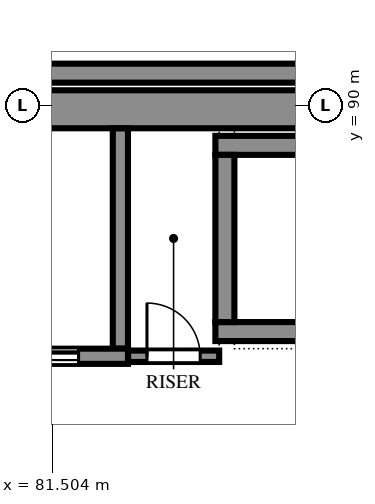
"""IFC4 building model, lengths in metres.
Left out: names, types, materials, properties, quantities, classifications, styles, units other than length and angle.
Written with IfcOpenShell. Run it as: python <this file> out.ifc"""

import sys

from ifc_helpers import new_model, si_unit, direction, frame, frame_2d, origin, place, context, subcontext, project, spatial, polyline, rectangle, outline, extrude, element, fill, save


model = new_model("IFC4")
c1 = context("Model", 3, precision=1e-05, world=origin(), true_north=direction((0.0, 1.0)))
c2 = subcontext(c1, "Body", "Model", "MODEL_VIEW")
j1 = project(units=[si_unit("LENGTHUNIT", "METRE"), si_unit("PLANEANGLEUNIT", "RADIAN")], contexts=[c1])
p1 = place(None, origin())
s1 = spatial("IfcSite", under=j1, at=p1, CompositionType="ELEMENT")
p2 = place(p1, origin())
s2 = spatial("IfcBuilding", under=s1, at=p2, CompositionType="ELEMENT")
p3 = place(p2, frame((0.0, 0.0, 11.7)))
s3 = spatial("IfcBuildingStorey", under=s2, at=p3, CompositionType="ELEMENT", Elevation=11.7)
p4 = place(p3, frame((71.8, 89.95, 0.0), z_axis=(0.0, 0.0, 1.0), x_axis=(1.0, 0.0, 0.0)))
e1 = element("IfcWall", 1, at=p4, inside=s3, PredefinedType="SOLIDWALL", context=c2, shape_type="SweptSolid", body=[
    extrude(rectangle(XDim=18.4, YDim=0.5, at=frame_2d((9.2, 0.0))), origin(), (0.0, 0.0, 1.0), 4.2),
])
p5 = place(p3, frame((71.45, 90.425, 0.0), z_axis=(0.0, 0.0, 1.0), x_axis=(1.0, 0.0, 0.0)))
e2 = element("IfcWall", 2, at=p5, inside=s3, PredefinedType="SOLIDWALL", context=c2, shape_type="SweptSolid", body=[
    extrude(outline(polyline([(0.0, 0.0), (19.1, 0.0), (19.1, 12.6), (0.0, 12.6), (0.0, 0.0)]), holes=[polyline([(1.308, 2.439), (1.352, 2.546), (1.408, 2.646), (1.475, 2.74), (1.552, 2.826), (1.638, 2.903), (1.732, 2.969), (1.833, 3.025), (1.939, 3.068), (2.05, 3.1), (2.161, 3.068), (2.267, 3.025), (2.368, 2.969), (2.462, 2.903), (2.549, 2.826), (2.625, 2.74), (2.692, 2.646), (2.748, 2.546), (2.792, 2.439), (2.824, 2.329), (2.844, 2.215), (2.85, 2.1), (2.85, 0.6), (1.25, 0.6), (1.25, 2.1), (1.257, 2.215), (1.276, 2.329), (1.308, 2.439)]), polyline([(4.308, 2.439), (4.352, 2.546), (4.408, 2.646), (4.475, 2.74), (4.552, 2.826), (4.638, 2.903), (4.732, 2.969), (4.833, 3.025), (4.939, 3.068), (5.05, 3.1), (5.161, 3.068), (5.267, 3.025), (5.368, 2.969), (5.462, 2.903), (5.549, 2.826), (5.625, 2.74), (5.692, 2.646), (5.748, 2.546), (5.792, 2.439), (5.824, 2.329), (5.844, 2.215), (5.85, 2.1), (5.85, 0.6), (4.25, 0.6), (4.25, 2.1), (4.257, 2.215), (4.276, 2.329), (4.308, 2.439)]), polyline([(7.308, 2.439), (7.352, 2.546), (7.408, 2.646), (7.475, 2.74), (7.552, 2.826), (7.638, 2.903), (7.732, 2.969), (7.833, 3.025), (7.939, 3.068), (8.05, 3.1), (8.161, 3.068), (8.267, 3.025), (8.368, 2.969), (8.462, 2.903), (8.549, 2.826), (8.625, 2.74), (8.692, 2.646), (8.748, 2.546), (8.792, 2.439), (8.824, 2.329), (8.844, 2.215), (8.85, 2.1), (8.85, 0.6), (7.25, 0.6), (7.25, 2.1), (7.257, 2.215), (7.276, 2.329), (7.308, 2.439)]), polyline([(1.308, 6.639), (1.352, 6.746), (1.408, 6.846), (1.475, 6.94), (1.552, 7.026), (1.638, 7.103), (1.732, 7.169), (1.833, 7.225), (1.939, 7.269), (2.05, 7.3), (2.161, 7.269), (2.267, 7.225), (2.368, 7.169), (2.462, 7.103), (2.549, 7.026), (2.625, 6.94), (2.692, 6.846), (2.748, 6.746), (2.792, 6.639), (2.824, 6.529), (2.844, 6.415), (2.85, 6.3), (2.85, 4.8), (1.25, 4.8), (1.25, 6.3), (1.257, 6.415), (1.276, 6.529), (1.308, 6.639)]), polyline([(4.308, 6.639), (4.352, 6.746), (4.408, 6.846), (4.475, 6.94), (4.552, 7.026), (4.638, 7.103), (4.732, 7.169), (4.833, 7.225), (4.939, 7.269), (5.05, 7.3), (5.161, 7.269), (5.267, 7.225), (5.368, 7.169), (5.462, 7.103), (5.549, 7.026), (5.625, 6.94), (5.692, 6.846), (5.748, 6.746), (5.792, 6.639), (5.824, 6.529), (5.844, 6.415), (5.85, 6.3), (5.85, 4.8), (4.25, 4.8), (4.25, 6.3), (4.257, 6.415), (4.276, 6.529), (4.308, 6.639)]), polyline([(7.308, 6.639), (7.352, 6.746), (7.408, 6.846), (7.475, 6.94), (7.552, 7.026), (7.638, 7.103), (7.732, 7.169), (7.833, 7.225), (7.939, 7.269), (8.05, 7.3), (8.161, 7.269), (8.267, 7.225), (8.368, 7.169), (8.462, 7.103), (8.549, 7.026), (8.625, 6.94), (8.692, 6.846), (8.748, 6.746), (8.792, 6.639), (8.824, 6.529), (8.844, 6.415), (8.85, 6.3), (8.85, 4.8), (7.25, 4.8), (7.25, 6.3), (7.257, 6.415), (7.276, 6.529), (7.308, 6.639)]), polyline([(1.308, 10.839), (1.352, 10.946), (1.408, 11.046), (1.475, 11.14), (1.552, 11.226), (1.638, 11.303), (1.732, 11.369), (1.833, 11.425), (1.939, 11.469), (2.05, 11.5), (2.161, 11.469), (2.267, 11.425), (2.368, 11.369), (2.462, 11.303), (2.549, 11.226), (2.625, 11.14), (2.692, 11.046), (2.748, 10.946), (2.792, 10.839), (2.824, 10.729), (2.844, 10.615), (2.85, 10.5), (2.85, 9.0), (1.25, 9.0), (1.25, 10.5), (1.257, 10.615), (1.276, 10.729), (1.308, 10.839)]), polyline([(4.352, 10.946), (4.408, 11.046), (4.475, 11.14), (4.552, 11.226), (4.638, 11.303), (4.732, 11.369), (4.833, 11.425), (4.939, 11.469), (5.05, 11.5), (5.161, 11.469), (5.267, 11.425), (5.368, 11.369), (5.462, 11.303), (5.549, 11.226), (5.625, 11.14), (5.692, 11.046), (5.748, 10.946), (5.792, 10.839), (5.824, 10.729), (5.844, 10.615), (5.85, 10.5), (5.85, 9.0), (4.25, 9.0), (4.25, 10.5), (4.257, 10.615), (4.276, 10.729), (4.308, 10.839), (4.352, 10.946)]), polyline([(7.352, 10.946), (7.408, 11.046), (7.475, 11.14), (7.552, 11.226), (7.638, 11.303), (7.732, 11.369), (7.833, 11.425), (7.939, 11.469), (8.05, 11.5), (8.161, 11.469), (8.267, 11.425), (8.368, 11.369), (8.462, 11.303), (8.549, 11.226), (8.625, 11.14), (8.692, 11.046), (8.748, 10.946), (8.792, 10.839), (8.824, 10.729), (8.844, 10.615), (8.85, 10.5), (8.85, 9.0), (7.25, 9.0), (7.25, 10.5), (7.257, 10.615), (7.276, 10.729), (7.308, 10.839), (7.352, 10.946)]), polyline([(10.308, 2.439), (10.352, 2.546), (10.408, 2.646), (10.475, 2.74), (10.552, 2.826), (10.638, 2.903), (10.732, 2.969), (10.833, 3.025), (10.939, 3.068), (11.05, 3.1), (11.161, 3.068), (11.267, 3.025), (11.368, 2.969), (11.462, 2.903), (11.549, 2.826), (11.625, 2.74), (11.692, 2.646), (11.748, 2.546), (11.792, 2.439), (11.824, 2.329), (11.844, 2.215), (11.85, 2.1), (11.85, 0.6), (10.25, 0.6), (10.25, 2.1), (10.257, 2.215), (10.276, 2.329), (10.308, 2.439)]), polyline([(13.308, 2.439), (13.352, 2.546), (13.408, 2.646), (13.475, 2.74), (13.552, 2.826), (13.638, 2.903), (13.732, 2.969), (13.833, 3.025), (13.939, 3.068), (14.05, 3.1), (14.161, 3.068), (14.267, 3.025), (14.368, 2.969), (14.462, 2.903), (14.549, 2.826), (14.625, 2.74), (14.692, 2.646), (14.748, 2.546), (14.792, 2.439), (14.824, 2.329), (14.844, 2.215), (14.85, 2.1), (14.85, 0.6), (13.25, 0.6), (13.25, 2.1), (13.257, 2.215), (13.276, 2.329), (13.308, 2.439)]), polyline([(16.308, 2.439), (16.352, 2.546), (16.408, 2.646), (16.475, 2.74), (16.552, 2.826), (16.638, 2.903), (16.732, 2.969), (16.833, 3.025), (16.939, 3.068), (17.05, 3.1), (17.161, 3.068), (17.267, 3.025), (17.368, 2.969), (17.462, 2.903), (17.549, 2.826), (17.625, 2.74), (17.692, 2.646), (17.748, 2.546), (17.792, 2.439), (17.824, 2.329), (17.844, 2.215), (17.85, 2.1), (17.85, 0.6), (16.25, 0.6), (16.25, 2.1), (16.257, 2.215), (16.276, 2.329), (16.308, 2.439)]), polyline([(10.308, 6.639), (10.352, 6.746), (10.408, 6.846), (10.475, 6.94), (10.552, 7.026), (10.638, 7.103), (10.732, 7.169), (10.833, 7.225), (10.939, 7.269), (11.05, 7.3), (11.161, 7.269), (11.267, 7.225), (11.368, 7.169), (11.462, 7.103), (11.549, 7.026), (11.625, 6.94), (11.692, 6.846), (11.748, 6.746), (11.792, 6.639), (11.824, 6.529), (11.844, 6.415), (11.85, 6.3), (11.85, 4.8), (10.25, 4.8), (10.25, 6.3), (10.257, 6.415), (10.276, 6.529), (10.308, 6.639)]), polyline([(13.308, 6.639), (13.352, 6.746), (13.408, 6.846), (13.475, 6.94), (13.552, 7.026), (13.638, 7.103), (13.732, 7.169), (13.833, 7.225), (13.939, 7.269), (14.05, 7.3), (14.161, 7.269), (14.267, 7.225), (14.368, 7.169), (14.462, 7.103), (14.549, 7.026), (14.625, 6.94), (14.692, 6.846), (14.748, 6.746), (14.792, 6.639), (14.824, 6.529), (14.844, 6.415), (14.85, 6.3), (14.85, 4.8), (13.25, 4.8), (13.25, 6.3), (13.257, 6.415), (13.276, 6.529), (13.308, 6.639)]), polyline([(16.308, 6.639), (16.352, 6.746), (16.408, 6.846), (16.475, 6.94), (16.552, 7.026), (16.638, 7.103), (16.732, 7.169), (16.833, 7.225), (16.939, 7.269), (17.05, 7.3), (17.161, 7.269), (17.267, 7.225), (17.368, 7.169), (17.462, 7.103), (17.549, 7.026), (17.625, 6.94), (17.692, 6.846), (17.748, 6.746), (17.792, 6.639), (17.824, 6.529), (17.844, 6.415), (17.85, 6.3), (17.85, 4.8), (16.25, 4.8), (16.25, 6.3), (16.257, 6.415), (16.276, 6.529), (16.308, 6.639)]), polyline([(10.308, 10.839), (10.352, 10.946), (10.408, 11.046), (10.475, 11.14), (10.552, 11.226), (10.638, 11.303), (10.732, 11.369), (10.833, 11.425), (10.939, 11.469), (11.05, 11.5), (11.161, 11.469), (11.267, 11.425), (11.368, 11.369), (11.462, 11.303), (11.549, 11.226), (11.625, 11.14), (11.692, 11.046), (11.748, 10.946), (11.792, 10.839), (11.824, 10.729), (11.844, 10.615), (11.85, 10.5), (11.85, 9.0), (10.25, 9.0), (10.25, 10.5), (10.257, 10.615), (10.276, 10.729), (10.308, 10.839)]), polyline([(13.352, 10.946), (13.408, 11.046), (13.475, 11.14), (13.552, 11.226), (13.638, 11.303), (13.732, 11.369), (13.833, 11.425), (13.939, 11.469), (14.05, 11.5), (14.161, 11.469), (14.267, 11.425), (14.368, 11.369), (14.462, 11.303), (14.549, 11.226), (14.625, 11.14), (14.692, 11.046), (14.748, 10.946), (14.792, 10.839), (14.824, 10.729), (14.844, 10.615), (14.85, 10.5), (14.85, 9.0), (13.25, 9.0), (13.25, 10.5), (13.257, 10.615), (13.276, 10.729), (13.308, 10.839), (13.352, 10.946)]), polyline([(16.352, 10.946), (16.408, 11.046), (16.475, 11.14), (16.552, 11.226), (16.638, 11.303), (16.732, 11.369), (16.833, 11.425), (16.939, 11.469), (17.05, 11.5), (17.161, 11.469), (17.267, 11.425), (17.368, 11.369), (17.462, 11.303), (17.549, 11.226), (17.625, 11.14), (17.692, 11.046), (17.748, 10.946), (17.792, 10.839), (17.824, 10.729), (17.844, 10.615), (17.85, 10.5), (17.85, 9.0), (16.25, 9.0), (16.25, 10.5), (16.257, 10.615), (16.276, 10.729), (16.308, 10.839), (16.352, 10.946)])]), frame((0.0, 0.125, 0.0), z_axis=(0.0, -1.0, 0.0), x_axis=(1.0, 0.0, 0.0)), (0.0, 0.0, 1.0), 0.25),
])
p6 = place(p3, frame((80.302, 86.7, 0.0), z_axis=(0.0, 0.0, 1.0), x_axis=(1.0, 0.0, 0.0)))
e3 = element("IfcWall", 3, at=p6, inside=s3, PredefinedType="SOLIDWALL", context=c2, shape_type="SweptSolid", body=[
    extrude(rectangle(XDim=2.198, YDim=0.2, at=frame_2d((1.099, 0.0))), origin(), (0.0, 0.0, 1.0), 3.516),
])
p7 = place(p6, frame((0.448, 0.0, 0.0)))
e4 = element("IfcOpeningElement", 4, at=p7, cuts=e3, PredefinedType="OPENING", context=c2, shape_type="SweptSolid", body=[
    extrude(rectangle(XDim=1.1, YDim=2.1, at=frame_2d((0.55, 1.05))), frame((0.0, 0.11, 0.0), z_axis=(0.0, -1.0, 0.0), x_axis=(1.0, 0.0, 0.0)), (0.0, 0.0, 1.0), 0.22),
])
p8 = place(p3, frame((82.4, 86.8, 0.0), z_axis=(0.0, 0.0, 1.0), x_axis=(0.0, 1.0, 0.0)))
e5 = element("IfcWall", 5, at=p8, inside=s3, PredefinedType="SOLIDWALL", context=c2, shape_type="SweptSolid", body=[
    extrude(rectangle(XDim=2.898, YDim=0.2, at=frame_2d((1.449, 0.0))), origin(), (0.0, 0.0, 1.0), 3.516),
])
for number, where, z_axis, x_axis in (
    (6, (83.65, 87.025, 0.0), (0.0, 0.0, 1.0), (1.0, 0.0, 0.0)),
    (7, (83.65, 89.475, 0.0), (0.0, 0.0, 1.0), (1.0, 0.0, 0.0)),
):
    element("IfcWall", number, at=place(p3, frame(where, z_axis=z_axis, x_axis=x_axis)), inside=s3, PredefinedType="SOLIDWALL", context=c2, shape_type="SweptSolid", body=[
        extrude(rectangle(XDim=3.4, YDim=0.25, at=frame_2d((1.7, 0.0))), origin(), (0.0, 0.0, 1.0), 3.516),
    ])
p9 = place(p3, frame((83.775, 87.15, 0.0), z_axis=(0.0, 0.0, 1.0), x_axis=(0.0, 1.0, 0.0)))
e8 = element("IfcWall", 8, at=p9, inside=s3, PredefinedType="SOLIDWALL", context=c2, shape_type="SweptSolid", body=[
    extrude(rectangle(XDim=2.2, YDim=0.25, at=frame_2d((1.1, 0.0))), origin(), (0.0, 0.0, 1.0), 3.516),
])
p10 = place(p3, frame((82.502, 86.7, 0.0), z_axis=(0.0, 0.0, 1.0), x_axis=(1.0, 0.0, 0.0)))
e9 = element("IfcWall", 9, at=p10, inside=s3, PredefinedType="SOLIDWALL", context=c2, shape_type="SweptSolid", body=[
    extrude(rectangle(XDim=1.198, YDim=0.15, at=frame_2d((0.599, 0.0))), origin(), (0.0, 0.0, 1.0), 3.516),
])
p11 = place(p10, frame((0.248, 0.0, 0.0)))
e10 = element("IfcOpeningElement", 10, at=p11, cuts=e9, PredefinedType="OPENING", context=c2, shape_type="SweptSolid", body=[
    extrude(rectangle(XDim=0.7, YDim=2.0, at=frame_2d((0.35, 1.0))), frame((0.0, 0.085, 0.0), z_axis=(0.0, -1.0, 0.0), x_axis=(1.0, 0.0, 0.0)), (0.0, 0.0, 1.0), 0.17),
])
p12 = place(p7, origin())
e11 = element("IfcDoor", 11, at=p12, inside=s3, OperationType="SLIDING_TO_LEFT", PredefinedType="DOOR", context=c2, shape_type="SweptSolid", body=[
    extrude(outline(polyline([(0.0, 0.0), (0.07, 0.0), (0.07, 2.03), (1.03, 2.03), (1.03, 0.0), (1.1, 0.0), (1.1, 2.1), (0.0, 2.1), (0.0, 0.0)])), frame((0.0, 0.025, 0.0), z_axis=(0.0, -1.0, 0.0), x_axis=(1.0, 0.0, 0.0)), (0.0, 0.0, 1.0), 0.05),
    extrude(rectangle(XDim=0.524, YDim=2.016, at=frame_2d((0.336, 1.018))), frame((0.0, 0.018, 0.0), z_axis=(0.0, -1.0, 0.0), x_axis=(1.0, 0.0, 0.0)), (0.0, 0.0, 1.0), 0.016),
    extrude(rectangle(XDim=0.52, YDim=2.016, at=frame_2d((0.766, 1.018))), frame((0.0, -0.002, 0.0), z_axis=(0.0, -1.0, 0.0), x_axis=(1.0, 0.0, 0.0)), (0.0, 0.0, 1.0), 0.016),
])
fill(e4, e11)
p13 = place(p11, origin())
e12 = element("IfcDoor", 12, at=p13, inside=s3, OperationType="SINGLE_SWING_LEFT", PredefinedType="DOOR", context=c2, shape_type="SweptSolid", body=[
    extrude(outline(polyline([(0.0, 0.0), (0.07, 0.0), (0.07, 1.93), (0.63, 1.93), (0.63, 0.0), (0.7, 0.0), (0.7, 2.0), (0.0, 2.0), (0.0, 0.0)])), frame((0.0, 0.025, 0.0), z_axis=(0.0, -1.0, 0.0), x_axis=(1.0, 0.0, 0.0)), (0.0, 0.0, 1.0), 0.05),
    extrude(outline(polyline([(0.074, 0.01), (0.626, 0.01), (0.626, 1.926), (0.074, 1.926), (0.074, 0.01)]), holes=[polyline([(0.184, 0.16), (0.516, 0.16), (0.516, 1.01), (0.184, 1.01), (0.184, 0.16)]), polyline([(0.2, 1.16), (0.5, 1.16), (0.5, 1.76), (0.2, 1.76), (0.2, 1.16)])]), frame((0.0, 0.017, 0.0), z_axis=(0.0, -1.0, 0.0), x_axis=(1.0, 0.0, 0.0)), (0.0, 0.0, 1.0), 0.035),
    extrude(rectangle(XDim=0.331, YDim=0.85, at=frame_2d((0.35, 0.585))), frame((0.0, 0.009, 0.0), z_axis=(0.0, -1.0, 0.0), x_axis=(1.0, 0.0, 0.0)), (0.0, 0.0, 1.0), 0.017),
    extrude(rectangle(XDim=0.3, YDim=0.6, at=frame_2d((0.35, 1.46))), frame((0.0, 0.006, 0.0), z_axis=(0.0, -1.0, 0.0), x_axis=(1.0, 0.0, 0.0)), (0.0, 0.0, 1.0), 0.012),
])
fill(e10, e12)
save(model, sys.argv[1])
